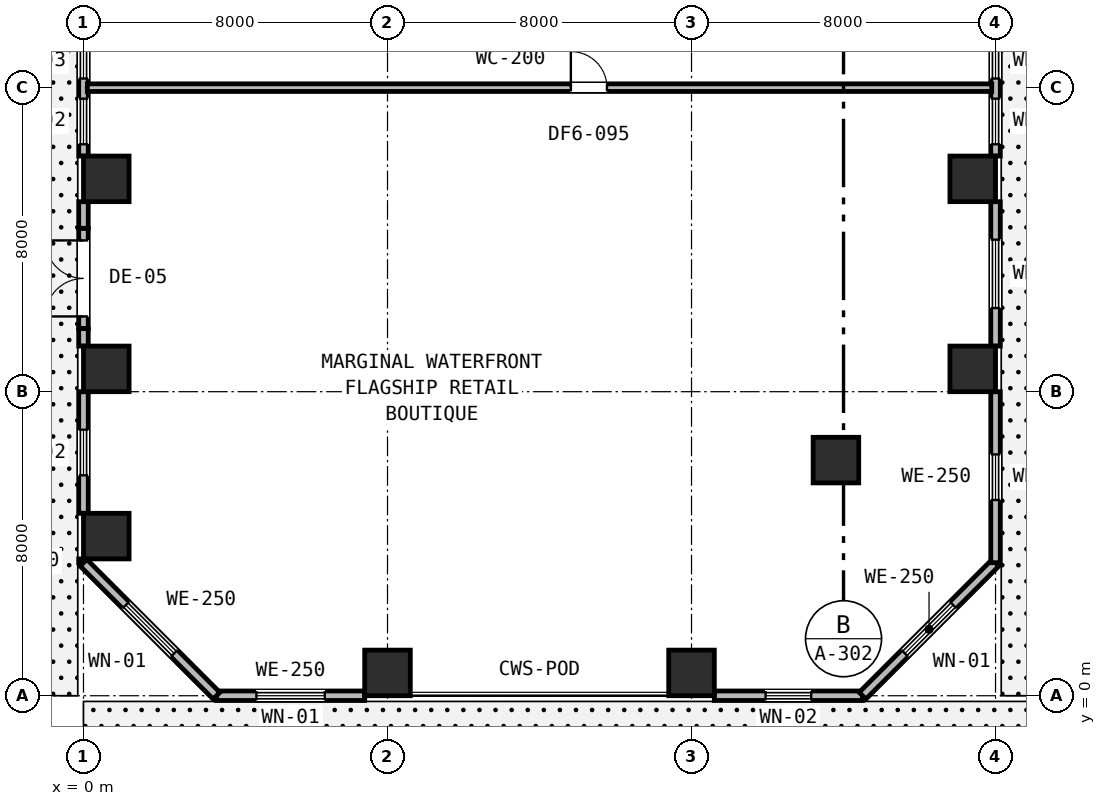
"""IFC4 building model, lengths in metres.
Left out: names, types, materials, properties, quantities, classifications, styles, units other than length and angle.
Written with IfcOpenShell. Run it as: python <this file> out.ifc"""

import sys

from ifc_helpers import new_model, si_unit, direction, frame, frame_2d, origin, origin_2d, place, context, subcontext, project, spatial, rectangle, extrude, element, fill, save


model = new_model("IFC4")
c1 = context("Model", 3, precision=1e-05, world=origin(), true_north=direction((0.0, 1.0)))
c2 = subcontext(c1, "Body", "Model", "MODEL_VIEW")
j1 = project(units=[si_unit("LENGTHUNIT", "METRE"), si_unit("PLANEANGLEUNIT", "RADIAN")], contexts=[c1])
p1 = place(None, origin())
s1 = spatial("IfcSite", under=j1, at=p1, CompositionType="ELEMENT")
p2 = place(p1, origin())
s2 = spatial("IfcBuilding", under=s1, at=p2, CompositionType="ELEMENT")
p3 = place(p2, origin())
s3 = spatial("IfcBuildingStorey", under=s2, at=p3, CompositionType="ELEMENT", Elevation=0.0)
for number, where, z_axis, x_axis in (
    (1, (0.6, 8.6, 0.0), (0.0, 0.0, 1.0), (1.0, 0.0, 0.0)),
    (2, (0.6, 13.6, 0.0), (0.0, 0.0, 1.0), (1.0, 0.0, 0.0)),
    (3, (0.6, 4.2, 0.0), (0.0, 0.0, 1.0), (1.0, 0.0, 0.0)),
    (4, (8.0, 0.6, 0.0), (0.0, 0.0, 1.0), (1.0, 0.0, 0.0)),
    (5, (16.0, 0.6, 0.0), (0.0, 0.0, 1.0), (1.0, 0.0, 0.0)),
    (6, (19.8, 6.2, 0.0), (0.0, 0.0, 1.0), (1.0, 0.0, 0.0)),
    (7, (23.4, 8.6, 0.0), (0.0, 0.0, 1.0), (1.0, 0.0, 0.0)),
    (8, (23.4, 13.6, 0.0), (0.0, 0.0, 1.0), (1.0, 0.0, 0.0)),
):
    element("IfcColumn", number, at=place(p3, frame(where, z_axis=z_axis, x_axis=x_axis)), inside=s3, PredefinedType="COLUMN", context=c2, shape_type="SweptSolid", body=[
        extrude(rectangle(XDim=1.2, YDim=1.2, at=origin_2d()), origin(), (0.0, 0.0, 1.0), 6.0),
    ])
p4 = place(p3, frame((3.5, 0.0, 0.0), z_axis=(0.0, 0.0, 1.0), x_axis=(1.0, 0.0, 0.0)))
e9 = element("IfcWall", 9, at=p4, inside=s3, PredefinedType="STANDARD", context=c2, shape_type="SweptSolid", body=[
    extrude(rectangle(XDim=3.9, YDim=0.25, at=frame_2d((1.95, 0.0))), origin(), (0.0, 0.0, 1.0), 5.67),
])
p5 = place(p4, frame((1.05, 0.0, 0.75)))
e10 = element("IfcOpeningElement", 10, at=p5, cuts=e9, PredefinedType="OPENING", context=c2, shape_type="SweptSolid", body=[
    extrude(rectangle(XDim=1.8, YDim=1.85, at=frame_2d((0.9, 0.925))), frame((0.0, 0.135, 0.0), z_axis=(0.0, -1.0, 0.0), x_axis=(1.0, 0.0, 0.0)), (0.0, 0.0, 1.0), 0.27),
])
p6 = place(p3, frame((16.6, 0.0, 0.0), z_axis=(0.0, 0.0, 1.0), x_axis=(1.0, 0.0, 0.0)))
e11 = element("IfcWall", 11, at=p6, inside=s3, PredefinedType="STANDARD", context=c2, shape_type="SweptSolid", body=[
    extrude(rectangle(XDim=3.9, YDim=0.25, at=frame_2d((1.95, 0.0))), origin(), (0.0, 0.0, 1.0), 5.67),
])
p7 = place(p6, frame((1.35, 0.0, 0.85)))
e12 = element("IfcOpeningElement", 12, at=p7, cuts=e11, PredefinedType="OPENING", context=c2, shape_type="SweptSolid", body=[
    extrude(rectangle(XDim=1.2, YDim=1.6, at=frame_2d((0.6, 0.8))), frame((0.0, 0.135, 0.0), z_axis=(0.0, -1.0, 0.0), x_axis=(1.0, 0.0, 0.0)), (0.0, 0.0, 1.0), 0.27),
])
p8 = place(p3, frame((20.5, 0.0, 0.0), z_axis=(0.0, 0.0, 1.0), x_axis=(0.707106781187, 0.707106781187, 0.0)))
e13 = element("IfcWall", 13, at=p8, inside=s3, PredefinedType="STANDARD", context=c2, shape_type="SweptSolid", body=[
    extrude(rectangle(XDim=4.95, YDim=0.25, at=frame_2d((2.475, 0.0))), origin(), (0.0, 0.0, 1.0), 5.67),
])
p9 = place(p8, frame((1.575, 0.0, 0.75)))
e14 = element("IfcOpeningElement", 14, at=p9, cuts=e13, PredefinedType="OPENING", context=c2, shape_type="SweptSolid", body=[
    extrude(rectangle(XDim=1.8, YDim=1.85, at=frame_2d((0.9, 0.925))), frame((0.0, 0.135, 0.0), z_axis=(0.0, -1.0, 0.0), x_axis=(1.0, 0.0, 0.0)), (0.0, 0.0, 1.0), 0.27),
])
p10 = place(p3, frame((24.0, 3.5, 0.0), z_axis=(0.0, 0.0, 1.0), x_axis=(0.0, 1.0, 0.0)))
e15 = element("IfcWall", 15, at=p10, inside=s3, PredefinedType="STANDARD", context=c2, shape_type="SweptSolid", body=[
    extrude(rectangle(XDim=4.5, YDim=0.25, at=frame_2d((2.25, 0.0))), origin(), (0.0, 0.0, 1.0), 5.67),
])
p11 = place(p10, frame((1.65, 0.0, 0.85)))
e16 = element("IfcOpeningElement", 16, at=p11, cuts=e15, PredefinedType="OPENING", context=c2, shape_type="SweptSolid", body=[
    extrude(rectangle(XDim=1.2, YDim=1.6, at=frame_2d((0.6, 0.8))), frame((0.0, 0.135, 0.0), z_axis=(0.0, -1.0, 0.0), x_axis=(1.0, 0.0, 0.0)), (0.0, 0.0, 1.0), 0.27),
])
p12 = place(p3, frame((24.0, 9.2, 0.0), z_axis=(0.0, 0.0, 1.0), x_axis=(0.0, 1.0, 0.0)))
e17 = element("IfcWall", 17, at=p12, inside=s3, PredefinedType="STANDARD", context=c2, shape_type="SweptSolid", body=[
    extrude(rectangle(XDim=3.8, YDim=0.25, at=frame_2d((1.9, 0.0))), origin(), (0.0, 0.0, 1.0), 5.67),
])
p13 = place(p12, frame((1.0, 0.0, 0.75)))
e18 = element("IfcOpeningElement", 18, at=p13, cuts=e17, PredefinedType="OPENING", context=c2, shape_type="SweptSolid", body=[
    extrude(rectangle(XDim=1.8, YDim=1.85, at=frame_2d((0.9, 0.925))), frame((0.0, 0.135, 0.0), z_axis=(0.0, -1.0, 0.0), x_axis=(1.0, 0.0, 0.0)), (0.0, 0.0, 1.0), 0.27),
])
p14 = place(p3, frame((24.0, 14.2, 0.0), z_axis=(0.0, 0.0, 1.0), x_axis=(0.0, 1.0, 0.0)))
e19 = element("IfcWall", 19, at=p14, inside=s3, PredefinedType="STANDARD", context=c2, shape_type="SweptSolid", body=[
    extrude(rectangle(XDim=3.2, YDim=0.25, at=frame_2d((1.6, 0.0))), origin(), (0.0, 0.0, 1.0), 5.67),
])
p15 = place(p14, frame((0.31, 0.0, 0.85)))
e20 = element("IfcOpeningElement", 20, at=p15, cuts=e19, PredefinedType="OPENING", context=c2, shape_type="SweptSolid", body=[
    extrude(rectangle(XDim=1.2, YDim=1.6, at=frame_2d((0.6, 0.8))), frame((0.0, 0.135, 0.0), z_axis=(0.0, -1.0, 0.0), x_axis=(1.0, 0.0, 0.0)), (0.0, 0.0, 1.0), 0.27),
])
p16 = place(p14, frame((2.04, 0.0, 0.9)))
e21 = element("IfcOpeningElement", 21, at=p16, cuts=e19, PredefinedType="OPENING", context=c2, shape_type="SweptSolid", body=[
    extrude(rectangle(XDim=0.9, YDim=1.55, at=frame_2d((0.45, 0.775))), frame((0.0, 0.135, 0.0), z_axis=(0.0, -1.0, 0.0), x_axis=(1.0, 0.0, 0.0)), (0.0, 0.0, 1.0), 0.27),
])
p17 = place(p3, frame((0.0, 9.66, 0.0), z_axis=(0.0, 0.0, 1.0), x_axis=(0.0, 1.0, 0.0)))
e22 = element("IfcWall", 22, at=p17, inside=s3, PredefinedType="STANDARD", context=c2, shape_type="SweptSolid", body=[
    extrude(rectangle(XDim=2.64, YDim=0.25, at=frame_2d((1.32, 0.0))), origin(), (0.0, 0.0, 1.0), 5.67),
])
p18 = place(p17, frame((0.32, 0.0, 0.0)))
e23 = element("IfcOpeningElement", 23, at=p18, cuts=e22, PredefinedType="OPENING", context=c2, shape_type="SweptSolid", body=[
    extrude(rectangle(XDim=2.0, YDim=2.4, at=frame_2d((1.0, 1.2))), frame((0.0, 0.135, 0.0), z_axis=(0.0, -1.0, 0.0), x_axis=(1.0, 0.0, 0.0)), (0.0, 0.0, 1.0), 0.27),
])
p19 = place(p3, frame((0.0, 17.4, 0.0), z_axis=(0.0, 0.0, 1.0), x_axis=(0.0, -1.0, 0.0)))
e24 = element("IfcWall", 24, at=p19, inside=s3, PredefinedType="STANDARD", context=c2, shape_type="SweptSolid", body=[
    extrude(rectangle(XDim=3.2, YDim=0.25, at=frame_2d((1.6, 0.0))), origin(), (0.0, 0.0, 1.0), 5.67),
])
p20 = place(p19, frame((0.26, 0.0, 0.9)))
e25 = element("IfcOpeningElement", 25, at=p20, cuts=e24, PredefinedType="OPENING", context=c2, shape_type="SweptSolid", body=[
    extrude(rectangle(XDim=0.9, YDim=1.55, at=frame_2d((0.45, 0.775))), frame((0.0, 0.135, 0.0), z_axis=(0.0, -1.0, 0.0), x_axis=(1.0, 0.0, 0.0)), (0.0, 0.0, 1.0), 0.27),
])
p21 = place(p19, frame((1.69, 0.0, 0.85)))
e26 = element("IfcOpeningElement", 26, at=p21, cuts=e24, PredefinedType="OPENING", context=c2, shape_type="SweptSolid", body=[
    extrude(rectangle(XDim=1.2, YDim=1.6, at=frame_2d((0.6, 0.8))), frame((0.0, 0.135, 0.0), z_axis=(0.0, -1.0, 0.0), x_axis=(1.0, 0.0, 0.0)), (0.0, 0.0, 1.0), 0.27),
])
p22 = place(p3, frame((0.0, 13.0, 0.0), z_axis=(0.0, 0.0, 1.0), x_axis=(0.0, -1.0, 0.0)))
e27 = element("IfcWall", 27, at=p22, inside=s3, PredefinedType="STANDARD", context=c2, shape_type="SweptSolid", body=[
    extrude(rectangle(XDim=0.7, YDim=0.25, at=frame_2d((0.35, 0.0))), origin(), (0.0, 0.0, 1.0), 5.67),
])
p23 = place(p3, frame((0.0, 9.66, 0.0), z_axis=(0.0, 0.0, 1.0), x_axis=(0.0, -1.0, 0.0)))
e28 = element("IfcWall", 28, at=p23, inside=s3, PredefinedType="STANDARD", context=c2, shape_type="SweptSolid", body=[
    extrude(rectangle(XDim=0.46, YDim=0.25, at=frame_2d((0.23, 0.0))), origin(), (0.0, 0.0, 1.0), 5.67),
])
p24 = place(p3, frame((0.0, 8.0, 0.0), z_axis=(0.0, 0.0, 1.0), x_axis=(0.0, -1.0, 0.0)))
e29 = element("IfcWall", 29, at=p24, inside=s3, PredefinedType="STANDARD", context=c2, shape_type="SweptSolid", body=[
    extrude(rectangle(XDim=3.2, YDim=0.25, at=frame_2d((1.6, 0.0))), origin(), (0.0, 0.0, 1.0), 5.67),
])
p25 = place(p24, frame((1.0, 0.0, 0.85)))
e30 = element("IfcOpeningElement", 30, at=p25, cuts=e29, PredefinedType="OPENING", context=c2, shape_type="SweptSolid", body=[
    extrude(rectangle(XDim=1.2, YDim=1.6, at=frame_2d((0.6, 0.8))), frame((0.0, 0.135, 0.0), z_axis=(0.0, -1.0, 0.0), x_axis=(1.0, 0.0, 0.0)), (0.0, 0.0, 1.0), 0.27),
])
p26 = place(p3, frame((0.0, 3.6, 0.0), z_axis=(0.0, 0.0, 1.0), x_axis=(0.0, -1.0, 0.0)))
e31 = element("IfcWall", 31, at=p26, inside=s3, PredefinedType="STANDARD", context=c2, shape_type="SweptSolid", body=[
    extrude(rectangle(XDim=0.1, YDim=0.25, at=frame_2d((0.05, 0.0))), origin(), (0.0, 0.0, 1.0), 5.67),
])
p27 = place(p3, frame((0.0, 3.5, 0.0), z_axis=(0.0, 0.0, 1.0), x_axis=(0.707106781187, -0.707106781187, 0.0)))
e32 = element("IfcWall", 32, at=p27, inside=s3, PredefinedType="STANDARD", context=c2, shape_type="SweptSolid", body=[
    extrude(rectangle(XDim=4.95, YDim=0.25, at=frame_2d((2.475, 0.0))), origin(), (0.0, 0.0, 1.0), 5.67),
])
p28 = place(p27, frame((1.575, 0.0, 0.75)))
e33 = element("IfcOpeningElement", 33, at=p28, cuts=e32, PredefinedType="OPENING", context=c2, shape_type="SweptSolid", body=[
    extrude(rectangle(XDim=1.8, YDim=1.85, at=frame_2d((0.9, 0.925))), frame((0.0, 0.135, 0.0), z_axis=(0.0, -1.0, 0.0), x_axis=(1.0, 0.0, 0.0)), (0.0, 0.0, 1.0), 0.27),
])
p29 = place(p3, frame((0.1, 16.0, 0.0), z_axis=(0.0, 0.0, 1.0), x_axis=(1.0, 0.0, 0.0)))
e34 = element("IfcWall", 34, at=p29, inside=s3, PredefinedType="PARTITIONING", context=c2, shape_type="SweptSolid", body=[
    extrude(rectangle(XDim=23.8, YDim=0.2, at=frame_2d((11.9, 0.0))), origin(), (0.0, 0.0, 1.0), 5.42),
])
p30 = place(p29, frame((12.725, 0.0, 0.0)))
e35 = element("IfcOpeningElement", 35, at=p30, cuts=e34, PredefinedType="OPENING", context=c2, shape_type="SweptSolid", body=[
    extrude(rectangle(XDim=0.95, YDim=2.15, at=frame_2d((0.475, 1.075))), frame((0.0, 0.11, 0.0), z_axis=(0.0, -1.0, 0.0), x_axis=(1.0, 0.0, 0.0)), (0.0, 0.0, 1.0), 0.22),
])
p31 = place(p5, origin())
e36 = element("IfcWindow", 36, at=p31, inside=s3, PartitioningType="SINGLE_PANEL", PredefinedType="WINDOW", context=c2, shape_type="SweptSolid", body=[
    extrude(rectangle(XDim=1.8, YDim=1.85, at=frame_2d((0.9, 0.925))), frame((0.0, 0.03, 0.0), z_axis=(0.0, -1.0, 0.0), x_axis=(1.0, 0.0, 0.0)), (0.0, 0.0, 1.0), 0.06),
])
fill(e10, e36)
p32 = place(p7, origin())
e37 = element("IfcWindow", 37, at=p32, inside=s3, PartitioningType="SINGLE_PANEL", PredefinedType="WINDOW", context=c2, shape_type="SweptSolid", body=[
    extrude(rectangle(XDim=1.2, YDim=1.6, at=frame_2d((0.6, 0.8))), frame((0.0, 0.03, 0.0), z_axis=(0.0, -1.0, 0.0), x_axis=(1.0, 0.0, 0.0)), (0.0, 0.0, 1.0), 0.06),
])
fill(e12, e37)
p33 = place(p9, origin())
e38 = element("IfcWindow", 38, at=p33, inside=s3, PartitioningType="SINGLE_PANEL", PredefinedType="WINDOW", context=c2, shape_type="SweptSolid", body=[
    extrude(rectangle(XDim=1.8, YDim=1.85, at=frame_2d((0.9, 0.925))), frame((0.0, 0.03, 0.0), z_axis=(0.0, -1.0, 0.0), x_axis=(1.0, 0.0, 0.0)), (0.0, 0.0, 1.0), 0.06),
])
fill(e14, e38)
p34 = place(p11, origin())
e39 = element("IfcWindow", 39, at=p34, inside=s3, PartitioningType="SINGLE_PANEL", PredefinedType="WINDOW", context=c2, shape_type="SweptSolid", body=[
    extrude(rectangle(XDim=1.2, YDim=1.6, at=frame_2d((0.6, 0.8))), frame((0.0, 0.03, 0.0), z_axis=(0.0, -1.0, 0.0), x_axis=(1.0, 0.0, 0.0)), (0.0, 0.0, 1.0), 0.06),
])
fill(e16, e39)
p35 = place(p13, origin())
e40 = element("IfcWindow", 40, at=p35, inside=s3, PartitioningType="SINGLE_PANEL", PredefinedType="WINDOW", context=c2, shape_type="SweptSolid", body=[
    extrude(rectangle(XDim=1.8, YDim=1.85, at=frame_2d((0.9, 0.925))), frame((0.0, 0.03, 0.0), z_axis=(0.0, -1.0, 0.0), x_axis=(1.0, 0.0, 0.0)), (0.0, 0.0, 1.0), 0.06),
])
fill(e18, e40)
p36 = place(p15, origin())
e41 = element("IfcWindow", 41, at=p36, inside=s3, PartitioningType="SINGLE_PANEL", PredefinedType="WINDOW", context=c2, shape_type="SweptSolid", body=[
    extrude(rectangle(XDim=1.2, YDim=1.6, at=frame_2d((0.6, 0.8))), frame((0.0, 0.03, 0.0), z_axis=(0.0, -1.0, 0.0), x_axis=(1.0, 0.0, 0.0)), (0.0, 0.0, 1.0), 0.06),
])
fill(e20, e41)
p37 = place(p16, origin())
e42 = element("IfcWindow", 42, at=p37, inside=s3, PartitioningType="SINGLE_PANEL", PredefinedType="WINDOW", context=c2, shape_type="SweptSolid", body=[
    extrude(rectangle(XDim=0.9, YDim=1.55, at=frame_2d((0.45, 0.775))), frame((0.0, 0.03, 0.0), z_axis=(0.0, -1.0, 0.0), x_axis=(1.0, 0.0, 0.0)), (0.0, 0.0, 1.0), 0.06),
])
fill(e21, e42)
p38 = place(p18, origin())
e43 = element("IfcDoor", 43, at=p38, inside=s3, OperationType="DOUBLE_DOOR_SINGLE_SWING", PredefinedType="DOOR", context=c2, shape_type="SweptSolid", body=[
    extrude(rectangle(XDim=2.0, YDim=2.4, at=frame_2d((1.0, 1.2))), frame((0.0, 0.025, 0.0), z_axis=(0.0, -1.0, 0.0), x_axis=(1.0, 0.0, 0.0)), (0.0, 0.0, 1.0), 0.05),
])
fill(e23, e43)
p39 = place(p20, origin())
e44 = element("IfcWindow", 44, at=p39, inside=s3, PartitioningType="SINGLE_PANEL", PredefinedType="WINDOW", context=c2, shape_type="SweptSolid", body=[
    extrude(rectangle(XDim=0.9, YDim=1.55, at=frame_2d((0.45, 0.775))), frame((0.0, 0.03, 0.0), z_axis=(0.0, -1.0, 0.0), x_axis=(1.0, 0.0, 0.0)), (0.0, 0.0, 1.0), 0.06),
])
fill(e25, e44)
p40 = place(p21, origin())
e45 = element("IfcWindow", 45, at=p40, inside=s3, PartitioningType="SINGLE_PANEL", PredefinedType="WINDOW", context=c2, shape_type="SweptSolid", body=[
    extrude(rectangle(XDim=1.2, YDim=1.6, at=frame_2d((0.6, 0.8))), frame((0.0, 0.03, 0.0), z_axis=(0.0, -1.0, 0.0), x_axis=(1.0, 0.0, 0.0)), (0.0, 0.0, 1.0), 0.06),
])
fill(e26, e45)
p41 = place(p25, origin())
e46 = element("IfcWindow", 46, at=p41, inside=s3, PartitioningType="SINGLE_PANEL", PredefinedType="WINDOW", context=c2, shape_type="SweptSolid", body=[
    extrude(rectangle(XDim=1.2, YDim=1.6, at=frame_2d((0.6, 0.8))), frame((0.0, 0.03, 0.0), z_axis=(0.0, -1.0, 0.0), x_axis=(1.0, 0.0, 0.0)), (0.0, 0.0, 1.0), 0.06),
])
fill(e30, e46)
p42 = place(p28, origin())
e47 = element("IfcWindow", 47, at=p42, inside=s3, PartitioningType="SINGLE_PANEL", PredefinedType="WINDOW", context=c2, shape_type="SweptSolid", body=[
    extrude(rectangle(XDim=1.8, YDim=1.85, at=frame_2d((0.9, 0.925))), frame((0.0, 0.03, 0.0), z_axis=(0.0, -1.0, 0.0), x_axis=(1.0, 0.0, 0.0)), (0.0, 0.0, 1.0), 0.06),
])
fill(e33, e47)
p43 = place(p30, origin())
e48 = element("IfcDoor", 48, at=p43, inside=s3, OperationType="SINGLE_SWING_LEFT", PredefinedType="DOOR", context=c2, shape_type="SweptSolid", body=[
    extrude(rectangle(XDim=0.95, YDim=2.15, at=frame_2d((0.475, 1.075))), frame((0.0, 0.025, 0.0), z_axis=(0.0, -1.0, 0.0), x_axis=(1.0, 0.0, 0.0)), (0.0, 0.0, 1.0), 0.05),
])
fill(e35, e48)
save(model, sys.argv[1])
